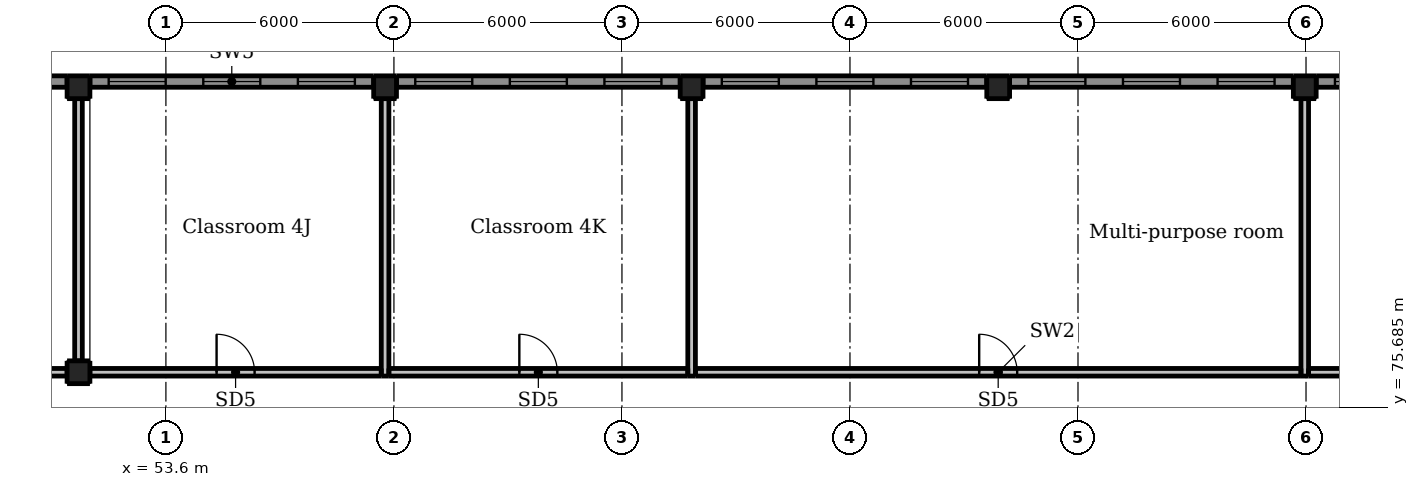
"""IFC4 building model, lengths in metres.
Left out: names, types, materials, properties, quantities, classifications, styles, units other than length and angle.
Written with IfcOpenShell. Run it as: python <this file> out.ifc"""

import sys

from ifc_helpers import new_model, si_unit, direction, frame, frame_2d, origin, origin_2d, place, context, subcontext, project, spatial, rectangle, extrude, element, fill, save


model = new_model("IFC4")
c1 = context("Model", 3, precision=1e-05, world=origin(), true_north=direction((0.0, 1.0)))
c2 = subcontext(c1, "Body", "Model", "MODEL_VIEW")
j1 = project(units=[si_unit("LENGTHUNIT", "METRE"), si_unit("PLANEANGLEUNIT", "RADIAN")], contexts=[c1])
p1 = place(None, origin())
s1 = spatial("IfcSite", under=j1, at=p1, CompositionType="ELEMENT")
p2 = place(p1, origin())
s2 = spatial("IfcBuilding", under=s1, at=p2, CompositionType="ELEMENT")
p3 = place(p2, frame((0.0, 0.0, 19.0)))
s3 = spatial("IfcBuildingStorey", under=s2, at=p3, CompositionType="ELEMENT", Elevation=19.0)
for number, where, z_axis, x_axis in (
    (1, (51.3, 76.6, -0.3), (0.0, 0.0, 1.0), (1.0, 0.0, 0.0)),
    (2, (51.3, 84.1, -0.3), (0.0, 0.0, 1.0), (1.0, 0.0, 0.0)),
    (3, (59.367, 84.1, -0.3), (0.0, 0.0, 1.0), (1.0, 0.0, 0.0)),
    (4, (67.433, 84.1, -0.3), (0.0, 0.0, 1.0), (1.0, 0.0, 0.0)),
    (5, (75.5, 84.1, -0.3), (0.0, 0.0, 1.0), (1.0, 0.0, 0.0)),
    (6, (83.567, 84.1, -0.3), (0.0, 0.0, 1.0), (1.0, 0.0, 0.0)),
):
    element("IfcColumn", number, at=place(p3, frame(where, z_axis=z_axis, x_axis=x_axis)), inside=s3, PredefinedType="COLUMN", context=c2, shape_type="SweptSolid", body=[
        extrude(rectangle(XDim=0.6, YDim=0.6, at=origin_2d()), origin(), (0.0, 0.0, 1.0), 4.35),
    ])
p4 = place(p3, frame((43.9, 84.25, 0.0), z_axis=(0.0, 0.0, 1.0), x_axis=(1.0, 0.0, 0.0)))
e7 = element("IfcWall", 7, at=p4, inside=s3, PredefinedType="SOLIDWALL", context=c2, shape_type="SweptSolid", body=[
    extrude(rectangle(XDim=7.1, YDim=0.3, at=frame_2d((3.55, 0.0))), origin(), (0.0, 0.0, 1.0), 3.15),
])
p5 = place(p4, frame((0.433, 0.0, 0.9)))
e8 = element("IfcOpeningElement", 8, at=p5, cuts=e7, PredefinedType="OPENING", context=c2, shape_type="SweptSolid", body=[
    extrude(rectangle(XDim=1.5, YDim=1.5, at=frame_2d((0.75, 0.75))), frame((0.0, 0.16, 0.0), z_axis=(0.0, -1.0, 0.0), x_axis=(1.0, 0.0, 0.0)), (0.0, 0.0, 1.0), 0.32),
])
p6 = place(p4, frame((2.8, 0.0, 0.9)))
e9 = element("IfcOpeningElement", 9, at=p6, cuts=e7, PredefinedType="OPENING", context=c2, shape_type="SweptSolid", body=[
    extrude(rectangle(XDim=1.5, YDim=1.5, at=frame_2d((0.75, 0.75))), frame((0.0, 0.16, 0.0), z_axis=(0.0, -1.0, 0.0), x_axis=(1.0, 0.0, 0.0)), (0.0, 0.0, 1.0), 0.32),
])
p7 = place(p4, frame((5.167, 0.0, 0.9)))
e10 = element("IfcOpeningElement", 10, at=p7, cuts=e7, PredefinedType="OPENING", context=c2, shape_type="SweptSolid", body=[
    extrude(rectangle(XDim=1.5, YDim=1.5, at=frame_2d((0.75, 0.75))), frame((0.0, 0.16, 0.0), z_axis=(0.0, -1.0, 0.0), x_axis=(1.0, 0.0, 0.0)), (0.0, 0.0, 1.0), 0.32),
])
p8 = place(p3, frame((51.6, 84.25, 0.0), z_axis=(0.0, 0.0, 1.0), x_axis=(1.0, 0.0, 0.0)))
e11 = element("IfcWall", 11, at=p8, inside=s3, PredefinedType="SOLIDWALL", context=c2, shape_type="SweptSolid", body=[
    extrude(rectangle(XDim=7.467, YDim=0.3, at=frame_2d((3.733, 0.0))), origin(), (0.0, 0.0, 1.0), 3.15),
])
p9 = place(p8, frame((0.494, 0.0, 0.9)))
e12 = element("IfcOpeningElement", 12, at=p9, cuts=e11, PredefinedType="OPENING", context=c2, shape_type="SweptSolid", body=[
    extrude(rectangle(XDim=1.5, YDim=1.5, at=frame_2d((0.75, 0.75))), frame((0.0, 0.16, 0.0), z_axis=(0.0, -1.0, 0.0), x_axis=(1.0, 0.0, 0.0)), (0.0, 0.0, 1.0), 0.32),
])
p10 = place(p8, frame((2.983, 0.0, 0.9)))
e13 = element("IfcOpeningElement", 13, at=p10, cuts=e11, PredefinedType="OPENING", context=c2, shape_type="SweptSolid", body=[
    extrude(rectangle(XDim=1.5, YDim=1.5, at=frame_2d((0.75, 0.75))), frame((0.0, 0.16, 0.0), z_axis=(0.0, -1.0, 0.0), x_axis=(1.0, 0.0, 0.0)), (0.0, 0.0, 1.0), 0.32),
])
p11 = place(p8, frame((5.472, 0.0, 0.9)))
e14 = element("IfcOpeningElement", 14, at=p11, cuts=e11, PredefinedType="OPENING", context=c2, shape_type="SweptSolid", body=[
    extrude(rectangle(XDim=1.5, YDim=1.5, at=frame_2d((0.75, 0.75))), frame((0.0, 0.16, 0.0), z_axis=(0.0, -1.0, 0.0), x_axis=(1.0, 0.0, 0.0)), (0.0, 0.0, 1.0), 0.32),
])
p12 = place(p3, frame((59.667, 84.25, 0.0), z_axis=(0.0, 0.0, 1.0), x_axis=(1.0, 0.0, 0.0)))
e15 = element("IfcWall", 15, at=p12, inside=s3, PredefinedType="SOLIDWALL", context=c2, shape_type="SweptSolid", body=[
    extrude(rectangle(XDim=7.466, YDim=0.3, at=frame_2d((3.733, 0.0))), origin(), (0.0, 0.0, 1.0), 3.15),
])
p13 = place(p12, frame((0.494, 0.0, 0.9)))
e16 = element("IfcOpeningElement", 16, at=p13, cuts=e15, PredefinedType="OPENING", context=c2, shape_type="SweptSolid", body=[
    extrude(rectangle(XDim=1.5, YDim=1.5, at=frame_2d((0.75, 0.75))), frame((0.0, 0.16, 0.0), z_axis=(0.0, -1.0, 0.0), x_axis=(1.0, 0.0, 0.0)), (0.0, 0.0, 1.0), 0.32),
])
p14 = place(p12, frame((2.983, 0.0, 0.9)))
e17 = element("IfcOpeningElement", 17, at=p14, cuts=e15, PredefinedType="OPENING", context=c2, shape_type="SweptSolid", body=[
    extrude(rectangle(XDim=1.5, YDim=1.5, at=frame_2d((0.75, 0.75))), frame((0.0, 0.16, 0.0), z_axis=(0.0, -1.0, 0.0), x_axis=(1.0, 0.0, 0.0)), (0.0, 0.0, 1.0), 0.32),
])
p15 = place(p12, frame((5.472, 0.0, 0.9)))
e18 = element("IfcOpeningElement", 18, at=p15, cuts=e15, PredefinedType="OPENING", context=c2, shape_type="SweptSolid", body=[
    extrude(rectangle(XDim=1.5, YDim=1.5, at=frame_2d((0.75, 0.75))), frame((0.0, 0.16, 0.0), z_axis=(0.0, -1.0, 0.0), x_axis=(1.0, 0.0, 0.0)), (0.0, 0.0, 1.0), 0.32),
])
p16 = place(p3, frame((67.733, 84.25, 0.0), z_axis=(0.0, 0.0, 1.0), x_axis=(1.0, 0.0, 0.0)))
e19 = element("IfcWall", 19, at=p16, inside=s3, PredefinedType="SOLIDWALL", context=c2, shape_type="SweptSolid", body=[
    extrude(rectangle(XDim=7.467, YDim=0.3, at=frame_2d((3.733, 0.0))), origin(), (0.0, 0.0, 1.0), 3.15),
])
p17 = place(p16, frame((0.494, 0.0, 0.9)))
e20 = element("IfcOpeningElement", 20, at=p17, cuts=e19, PredefinedType="OPENING", context=c2, shape_type="SweptSolid", body=[
    extrude(rectangle(XDim=1.5, YDim=1.5, at=frame_2d((0.75, 0.75))), frame((0.0, 0.16, 0.0), z_axis=(0.0, -1.0, 0.0), x_axis=(1.0, 0.0, 0.0)), (0.0, 0.0, 1.0), 0.32),
])
p18 = place(p16, frame((2.983, 0.0, 0.9)))
e21 = element("IfcOpeningElement", 21, at=p18, cuts=e19, PredefinedType="OPENING", context=c2, shape_type="SweptSolid", body=[
    extrude(rectangle(XDim=1.5, YDim=1.5, at=frame_2d((0.75, 0.75))), frame((0.0, 0.16, 0.0), z_axis=(0.0, -1.0, 0.0), x_axis=(1.0, 0.0, 0.0)), (0.0, 0.0, 1.0), 0.32),
])
p19 = place(p16, frame((5.472, 0.0, 0.9)))
e22 = element("IfcOpeningElement", 22, at=p19, cuts=e19, PredefinedType="OPENING", context=c2, shape_type="SweptSolid", body=[
    extrude(rectangle(XDim=1.5, YDim=1.5, at=frame_2d((0.75, 0.75))), frame((0.0, 0.16, 0.0), z_axis=(0.0, -1.0, 0.0), x_axis=(1.0, 0.0, 0.0)), (0.0, 0.0, 1.0), 0.32),
])
p20 = place(p3, frame((75.8, 84.25, 0.0), z_axis=(0.0, 0.0, 1.0), x_axis=(1.0, 0.0, 0.0)))
e23 = element("IfcWall", 23, at=p20, inside=s3, PredefinedType="SOLIDWALL", context=c2, shape_type="SweptSolid", body=[
    extrude(rectangle(XDim=7.467, YDim=0.3, at=frame_2d((3.733, 0.0))), origin(), (0.0, 0.0, 1.0), 3.15),
])
p21 = place(p20, frame((0.494, 0.0, 0.9)))
e24 = element("IfcOpeningElement", 24, at=p21, cuts=e23, PredefinedType="OPENING", context=c2, shape_type="SweptSolid", body=[
    extrude(rectangle(XDim=1.5, YDim=1.5, at=frame_2d((0.75, 0.75))), frame((0.0, 0.16, 0.0), z_axis=(0.0, -1.0, 0.0), x_axis=(1.0, 0.0, 0.0)), (0.0, 0.0, 1.0), 0.32),
])
p22 = place(p20, frame((2.983, 0.0, 0.9)))
e25 = element("IfcOpeningElement", 25, at=p22, cuts=e23, PredefinedType="OPENING", context=c2, shape_type="SweptSolid", body=[
    extrude(rectangle(XDim=1.5, YDim=1.5, at=frame_2d((0.75, 0.75))), frame((0.0, 0.16, 0.0), z_axis=(0.0, -1.0, 0.0), x_axis=(1.0, 0.0, 0.0)), (0.0, 0.0, 1.0), 0.32),
])
p23 = place(p20, frame((5.472, 0.0, 0.9)))
e26 = element("IfcOpeningElement", 26, at=p23, cuts=e23, PredefinedType="OPENING", context=c2, shape_type="SweptSolid", body=[
    extrude(rectangle(XDim=1.5, YDim=1.5, at=frame_2d((0.75, 0.75))), frame((0.0, 0.16, 0.0), z_axis=(0.0, -1.0, 0.0), x_axis=(1.0, 0.0, 0.0)), (0.0, 0.0, 1.0), 0.32),
])
p24 = place(p3, frame((83.867, 84.25, 0.0), z_axis=(0.0, 0.0, 1.0), x_axis=(1.0, 0.0, 0.0)))
e27 = element("IfcWall", 27, at=p24, inside=s3, PredefinedType="SOLIDWALL", context=c2, shape_type="SweptSolid", body=[
    extrude(rectangle(XDim=7.466, YDim=0.3, at=frame_2d((3.733, 0.0))), origin(), (0.0, 0.0, 1.0), 3.15),
])
p25 = place(p24, frame((0.494, 0.0, 0.9)))
e28 = element("IfcOpeningElement", 28, at=p25, cuts=e27, PredefinedType="OPENING", context=c2, shape_type="SweptSolid", body=[
    extrude(rectangle(XDim=1.5, YDim=1.5, at=frame_2d((0.75, 0.75))), frame((0.0, 0.16, 0.0), z_axis=(0.0, -1.0, 0.0), x_axis=(1.0, 0.0, 0.0)), (0.0, 0.0, 1.0), 0.32),
])
p26 = place(p24, frame((2.983, 0.0, 0.9)))
e29 = element("IfcOpeningElement", 29, at=p26, cuts=e27, PredefinedType="OPENING", context=c2, shape_type="SweptSolid", body=[
    extrude(rectangle(XDim=1.5, YDim=1.5, at=frame_2d((0.75, 0.75))), frame((0.0, 0.16, 0.0), z_axis=(0.0, -1.0, 0.0), x_axis=(1.0, 0.0, 0.0)), (0.0, 0.0, 1.0), 0.32),
])
p27 = place(p24, frame((5.472, 0.0, 0.9)))
e30 = element("IfcOpeningElement", 30, at=p27, cuts=e27, PredefinedType="OPENING", context=c2, shape_type="SweptSolid", body=[
    extrude(rectangle(XDim=1.5, YDim=1.5, at=frame_2d((0.75, 0.75))), frame((0.0, 0.16, 0.0), z_axis=(0.0, -1.0, 0.0), x_axis=(1.0, 0.0, 0.0)), (0.0, 0.0, 1.0), 0.32),
])
p28 = place(p3, frame((36.2, 76.6, 0.0), z_axis=(0.0, 0.0, 1.0), x_axis=(1.0, 0.0, 0.0)))
e31 = element("IfcWall", 31, at=p28, inside=s3, PredefinedType="PARTITIONING", context=c2, shape_type="SweptSolid", body=[
    extrude(rectangle(XDim=14.8, YDim=0.2, at=frame_2d((7.4, 0.0))), origin(), (0.0, 0.0, 1.0), 2.85),
])
p29 = place(p28, frame((11.1, 0.0, 0.0)))
e32 = element("IfcOpeningElement", 32, at=p29, cuts=e31, PredefinedType="OPENING", context=c2, shape_type="SweptSolid", body=[
    extrude(rectangle(XDim=1.0, YDim=2.1, at=frame_2d((0.5, 1.05))), frame((0.0, 0.11, 0.0), z_axis=(0.0, -1.0, 0.0), x_axis=(1.0, 0.0, 0.0)), (0.0, 0.0, 1.0), 0.22),
])
p30 = place(p3, frame((51.3, 76.9, 0.0), z_axis=(0.0, 0.0, 1.0), x_axis=(0.0, 1.0, 0.0)))
e33 = element("IfcWall", 33, at=p30, inside=s3, PredefinedType="PARTITIONING", context=c2, shape_type="SweptSolid", body=[
    extrude(rectangle(XDim=6.9, YDim=0.2, at=frame_2d((3.45, 0.0))), origin(), (0.0, 0.0, 1.0), 2.85),
])
p31 = place(p3, frame((51.6, 76.6, 0.0), z_axis=(0.0, 0.0, 1.0), x_axis=(1.0, 0.0, 0.0)))
e34 = element("IfcWall", 34, at=p31, inside=s3, PredefinedType="PARTITIONING", context=c2, shape_type="SweptSolid", body=[
    extrude(rectangle(XDim=7.667, YDim=0.2, at=frame_2d((3.833, 0.0))), origin(), (0.0, 0.0, 1.0), 2.85),
])
p32 = place(p31, frame((3.333, 0.0, 0.0)))
e35 = element("IfcOpeningElement", 35, at=p32, cuts=e34, PredefinedType="OPENING", context=c2, shape_type="SweptSolid", body=[
    extrude(rectangle(XDim=1.0, YDim=2.1, at=frame_2d((0.5, 1.05))), frame((0.0, 0.11, 0.0), z_axis=(0.0, -1.0, 0.0), x_axis=(1.0, 0.0, 0.0)), (0.0, 0.0, 1.0), 0.22),
])
p33 = place(p3, frame((59.467, 76.6, 0.0), z_axis=(0.0, 0.0, 1.0), x_axis=(1.0, 0.0, 0.0)))
e36 = element("IfcWall", 36, at=p33, inside=s3, PredefinedType="PARTITIONING", context=c2, shape_type="SweptSolid", body=[
    extrude(rectangle(XDim=7.866, YDim=0.2, at=frame_2d((3.933, 0.0))), origin(), (0.0, 0.0, 1.0), 2.85),
])
p34 = place(p33, frame((3.433, 0.0, 0.0)))
e37 = element("IfcOpeningElement", 37, at=p34, cuts=e36, PredefinedType="OPENING", context=c2, shape_type="SweptSolid", body=[
    extrude(rectangle(XDim=1.0, YDim=2.1, at=frame_2d((0.5, 1.05))), frame((0.0, 0.11, 0.0), z_axis=(0.0, -1.0, 0.0), x_axis=(1.0, 0.0, 0.0)), (0.0, 0.0, 1.0), 0.22),
])
p35 = place(p3, frame((67.533, 76.6, 0.0), z_axis=(0.0, 0.0, 1.0), x_axis=(1.0, 0.0, 0.0)))
e38 = element("IfcWall", 38, at=p35, inside=s3, PredefinedType="PARTITIONING", context=c2, shape_type="SweptSolid", body=[
    extrude(rectangle(XDim=15.934, YDim=0.2, at=frame_2d((7.967, 0.0))), origin(), (0.0, 0.0, 1.0), 2.85),
])
p36 = place(p35, frame((7.467, 0.0, 0.0)))
e39 = element("IfcOpeningElement", 39, at=p36, cuts=e38, PredefinedType="OPENING", context=c2, shape_type="SweptSolid", body=[
    extrude(rectangle(XDim=1.0, YDim=2.1, at=frame_2d((0.5, 1.05))), frame((0.0, 0.11, 0.0), z_axis=(0.0, -1.0, 0.0), x_axis=(1.0, 0.0, 0.0)), (0.0, 0.0, 1.0), 0.22),
])
p37 = place(p3, frame((83.667, 76.6, 0.0), z_axis=(0.0, 0.0, 1.0), x_axis=(1.0, 0.0, 0.0)))
e40 = element("IfcWall", 40, at=p37, inside=s3, PredefinedType="PARTITIONING", context=c2, shape_type="SweptSolid", body=[
    extrude(rectangle(XDim=7.866, YDim=0.2, at=frame_2d((3.933, 0.0))), origin(), (0.0, 0.0, 1.0), 2.85),
])
p38 = place(p37, frame((3.433, 0.0, 0.0)))
e41 = element("IfcOpeningElement", 41, at=p38, cuts=e40, PredefinedType="OPENING", context=c2, shape_type="SweptSolid", body=[
    extrude(rectangle(XDim=1.0, YDim=2.1, at=frame_2d((0.5, 1.05))), frame((0.0, 0.11, 0.0), z_axis=(0.0, -1.0, 0.0), x_axis=(1.0, 0.0, 0.0)), (0.0, 0.0, 1.0), 0.22),
])
for number, where, z_axis, x_axis in (
    (42, (59.367, 76.5, 0.0), (0.0, 0.0, 1.0), (0.0, 1.0, 0.0)),
    (43, (67.433, 76.5, 0.0), (0.0, 0.0, 1.0), (0.0, 1.0, 0.0)),
    (44, (83.567, 76.5, 0.0), (0.0, 0.0, 1.0), (0.0, 1.0, 0.0)),
):
    element("IfcWall", number, at=place(p3, frame(where, z_axis=z_axis, x_axis=x_axis)), inside=s3, PredefinedType="PARTITIONING", context=c2, shape_type="SweptSolid", body=[
        extrude(rectangle(XDim=7.3, YDim=0.2, at=frame_2d((3.65, 0.0))), origin(), (0.0, 0.0, 1.0), 2.85),
    ])
p39 = place(p9, origin())
e45 = element("IfcWindow", 45, at=p39, inside=s3, PartitioningType="DOUBLE_PANEL_HORIZONTAL", PredefinedType="WINDOW", context=c2, shape_type="SweptSolid", body=[
    extrude(rectangle(XDim=1.5, YDim=1.5, at=frame_2d((0.75, 0.75))), frame((0.0, 0.03, 0.0), z_axis=(0.0, -1.0, 0.0), x_axis=(1.0, 0.0, 0.0)), (0.0, 0.0, 1.0), 0.06),
])
fill(e12, e45)
p40 = place(p10, origin())
e46 = element("IfcWindow", 46, at=p40, inside=s3, PartitioningType="DOUBLE_PANEL_HORIZONTAL", PredefinedType="WINDOW", context=c2, shape_type="SweptSolid", body=[
    extrude(rectangle(XDim=1.5, YDim=1.5, at=frame_2d((0.75, 0.75))), frame((0.0, 0.03, 0.0), z_axis=(0.0, -1.0, 0.0), x_axis=(1.0, 0.0, 0.0)), (0.0, 0.0, 1.0), 0.06),
])
fill(e13, e46)
p41 = place(p11, origin())
e47 = element("IfcWindow", 47, at=p41, inside=s3, PartitioningType="DOUBLE_PANEL_HORIZONTAL", PredefinedType="WINDOW", context=c2, shape_type="SweptSolid", body=[
    extrude(rectangle(XDim=1.5, YDim=1.5, at=frame_2d((0.75, 0.75))), frame((0.0, 0.03, 0.0), z_axis=(0.0, -1.0, 0.0), x_axis=(1.0, 0.0, 0.0)), (0.0, 0.0, 1.0), 0.06),
])
fill(e14, e47)
p42 = place(p13, origin())
e48 = element("IfcWindow", 48, at=p42, inside=s3, PartitioningType="DOUBLE_PANEL_HORIZONTAL", PredefinedType="WINDOW", context=c2, shape_type="SweptSolid", body=[
    extrude(rectangle(XDim=1.5, YDim=1.5, at=frame_2d((0.75, 0.75))), frame((0.0, 0.03, 0.0), z_axis=(0.0, -1.0, 0.0), x_axis=(1.0, 0.0, 0.0)), (0.0, 0.0, 1.0), 0.06),
])
fill(e16, e48)
p43 = place(p14, origin())
e49 = element("IfcWindow", 49, at=p43, inside=s3, PartitioningType="DOUBLE_PANEL_HORIZONTAL", PredefinedType="WINDOW", context=c2, shape_type="SweptSolid", body=[
    extrude(rectangle(XDim=1.5, YDim=1.5, at=frame_2d((0.75, 0.75))), frame((0.0, 0.03, 0.0), z_axis=(0.0, -1.0, 0.0), x_axis=(1.0, 0.0, 0.0)), (0.0, 0.0, 1.0), 0.06),
])
fill(e17, e49)
p44 = place(p15, origin())
e50 = element("IfcWindow", 50, at=p44, inside=s3, PartitioningType="DOUBLE_PANEL_HORIZONTAL", PredefinedType="WINDOW", context=c2, shape_type="SweptSolid", body=[
    extrude(rectangle(XDim=1.5, YDim=1.5, at=frame_2d((0.75, 0.75))), frame((0.0, 0.03, 0.0), z_axis=(0.0, -1.0, 0.0), x_axis=(1.0, 0.0, 0.0)), (0.0, 0.0, 1.0), 0.06),
])
fill(e18, e50)
p45 = place(p17, origin())
e51 = element("IfcWindow", 51, at=p45, inside=s3, PartitioningType="DOUBLE_PANEL_HORIZONTAL", PredefinedType="WINDOW", context=c2, shape_type="SweptSolid", body=[
    extrude(rectangle(XDim=1.5, YDim=1.5, at=frame_2d((0.75, 0.75))), frame((0.0, 0.03, 0.0), z_axis=(0.0, -1.0, 0.0), x_axis=(1.0, 0.0, 0.0)), (0.0, 0.0, 1.0), 0.06),
])
fill(e20, e51)
p46 = place(p18, origin())
e52 = element("IfcWindow", 52, at=p46, inside=s3, PartitioningType="DOUBLE_PANEL_HORIZONTAL", PredefinedType="WINDOW", context=c2, shape_type="SweptSolid", body=[
    extrude(rectangle(XDim=1.5, YDim=1.5, at=frame_2d((0.75, 0.75))), frame((0.0, 0.03, 0.0), z_axis=(0.0, -1.0, 0.0), x_axis=(1.0, 0.0, 0.0)), (0.0, 0.0, 1.0), 0.06),
])
fill(e21, e52)
p47 = place(p19, origin())
e53 = element("IfcWindow", 53, at=p47, inside=s3, PartitioningType="DOUBLE_PANEL_HORIZONTAL", PredefinedType="WINDOW", context=c2, shape_type="SweptSolid", body=[
    extrude(rectangle(XDim=1.5, YDim=1.5, at=frame_2d((0.75, 0.75))), frame((0.0, 0.03, 0.0), z_axis=(0.0, -1.0, 0.0), x_axis=(1.0, 0.0, 0.0)), (0.0, 0.0, 1.0), 0.06),
])
fill(e22, e53)
p48 = place(p21, origin())
e54 = element("IfcWindow", 54, at=p48, inside=s3, PartitioningType="DOUBLE_PANEL_HORIZONTAL", PredefinedType="WINDOW", context=c2, shape_type="SweptSolid", body=[
    extrude(rectangle(XDim=1.5, YDim=1.5, at=frame_2d((0.75, 0.75))), frame((0.0, 0.03, 0.0), z_axis=(0.0, -1.0, 0.0), x_axis=(1.0, 0.0, 0.0)), (0.0, 0.0, 1.0), 0.06),
])
fill(e24, e54)
p49 = place(p22, origin())
e55 = element("IfcWindow", 55, at=p49, inside=s3, PartitioningType="DOUBLE_PANEL_HORIZONTAL", PredefinedType="WINDOW", context=c2, shape_type="SweptSolid", body=[
    extrude(rectangle(XDim=1.5, YDim=1.5, at=frame_2d((0.75, 0.75))), frame((0.0, 0.03, 0.0), z_axis=(0.0, -1.0, 0.0), x_axis=(1.0, 0.0, 0.0)), (0.0, 0.0, 1.0), 0.06),
])
fill(e25, e55)
p50 = place(p23, origin())
e56 = element("IfcWindow", 56, at=p50, inside=s3, PartitioningType="DOUBLE_PANEL_HORIZONTAL", PredefinedType="WINDOW", context=c2, shape_type="SweptSolid", body=[
    extrude(rectangle(XDim=1.5, YDim=1.5, at=frame_2d((0.75, 0.75))), frame((0.0, 0.03, 0.0), z_axis=(0.0, -1.0, 0.0), x_axis=(1.0, 0.0, 0.0)), (0.0, 0.0, 1.0), 0.06),
])
fill(e26, e56)
p51 = place(p25, origin())
e57 = element("IfcWindow", 57, at=p51, inside=s3, PartitioningType="DOUBLE_PANEL_HORIZONTAL", PredefinedType="WINDOW", context=c2, shape_type="SweptSolid", body=[
    extrude(rectangle(XDim=1.5, YDim=1.5, at=frame_2d((0.75, 0.75))), frame((0.0, 0.03, 0.0), z_axis=(0.0, -1.0, 0.0), x_axis=(1.0, 0.0, 0.0)), (0.0, 0.0, 1.0), 0.06),
])
fill(e28, e57)
p52 = place(p32, origin())
e58 = element("IfcDoor", 58, at=p52, inside=s3, OperationType="SINGLE_SWING_LEFT", PredefinedType="DOOR", context=c2, shape_type="SweptSolid", body=[
    extrude(rectangle(XDim=1.0, YDim=2.1, at=frame_2d((0.5, 1.05))), frame((0.0, 0.025, 0.0), z_axis=(0.0, -1.0, 0.0), x_axis=(1.0, 0.0, 0.0)), (0.0, 0.0, 1.0), 0.05),
])
fill(e35, e58)
p53 = place(p34, origin())
e59 = element("IfcDoor", 59, at=p53, inside=s3, OperationType="SINGLE_SWING_LEFT", PredefinedType="DOOR", context=c2, shape_type="SweptSolid", body=[
    extrude(rectangle(XDim=1.0, YDim=2.1, at=frame_2d((0.5, 1.05))), frame((0.0, 0.025, 0.0), z_axis=(0.0, -1.0, 0.0), x_axis=(1.0, 0.0, 0.0)), (0.0, 0.0, 1.0), 0.05),
])
fill(e37, e59)
p54 = place(p36, origin())
e60 = element("IfcDoor", 60, at=p54, inside=s3, OperationType="SINGLE_SWING_LEFT", PredefinedType="DOOR", context=c2, shape_type="SweptSolid", body=[
    extrude(rectangle(XDim=1.0, YDim=2.1, at=frame_2d((0.5, 1.05))), frame((0.0, 0.025, 0.0), z_axis=(0.0, -1.0, 0.0), x_axis=(1.0, 0.0, 0.0)), (0.0, 0.0, 1.0), 0.05),
])
fill(e39, e60)
save(model, sys.argv[1])
